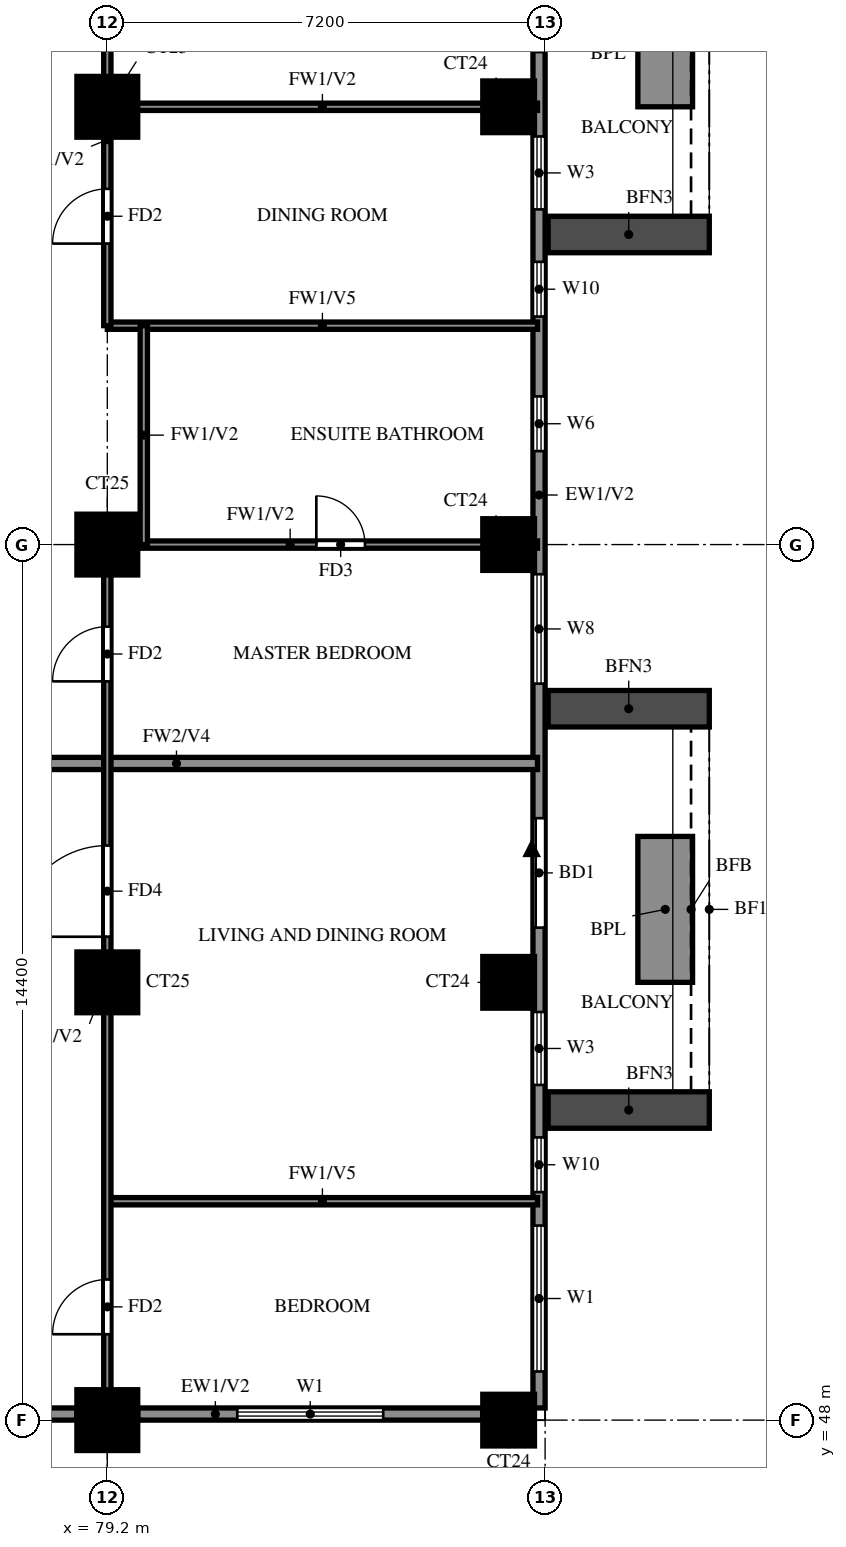
"""IFC4 building model, lengths in metres.
Left out: names, types, materials, properties, quantities, classifications, styles, units other than length and angle.
Written with IfcOpenShell. Run it as: python <this file> out.ifc"""

import sys

from ifc_helpers import new_model, si_unit, direction, frame, frame_2d, origin, origin_2d, place, context, subcontext, project, spatial, rectangle, extrude, source, transform, mapped, element, fill, save


model = new_model("IFC4")
c1 = context("Model", 3, precision=1e-05, world=origin(), true_north=direction((0.0, 1.0)))
c2 = subcontext(c1, "Body", "Model", "MODEL_VIEW")
j1 = project(units=[si_unit("LENGTHUNIT", "METRE"), si_unit("PLANEANGLEUNIT", "RADIAN")], contexts=[c1])
p1 = place(None, origin())
s1 = spatial("IfcSite", under=j1, at=p1, CompositionType="ELEMENT")
p2 = place(p1, origin())
s2 = spatial("IfcBuilding", under=s1, at=p2, CompositionType="ELEMENT")
p3 = place(p2, frame((0.0, 0.0, 143.0)))
s3 = spatial("IfcBuildingStorey", under=s2, at=p3, CompositionType="ELEMENT", Elevation=143.0)
m1 = source(origin(), c2, "Body", "SweptSolid", [
    extrude(rectangle(XDim=1.0, YDim=1.0, at=origin_2d()), origin(), (0.0, 0.0, 1.0), 3.2),
])
p4 = place(p3, frame((79.2, 48.0, 0.0), z_axis=(0.0, 0.0, 1.0), x_axis=(1.0, 0.0, 0.0)))
e1 = element("IfcColumn", 1, at=p4, inside=s3, PredefinedType="COLUMN", context=c2, shape_type="MappedRepresentation", body=[
    mapped(m1, transform((0.0, 0.0, 0.0))),
])
m2 = source(origin(), c2, "Body", "SweptSolid", [
    extrude(rectangle(XDim=0.85, YDim=0.85, at=origin_2d()), origin(), (0.0, 0.0, 1.0), 3.2),
])
p5 = place(p3, frame((85.8, 48.0, 0.0), z_axis=(0.0, 0.0, 1.0), x_axis=(1.0, 0.0, 0.0)))
e2 = element("IfcColumn", 2, at=p5, inside=s3, PredefinedType="COLUMN", context=c2, shape_type="MappedRepresentation", body=[
    mapped(m2, transform((0.0, 0.0, 0.0))),
])
p6 = place(p3, frame((79.2, 55.2, 0.0), z_axis=(0.0, 0.0, 1.0), x_axis=(1.0, 0.0, 0.0)))
e3 = element("IfcColumn", 3, at=p6, inside=s3, PredefinedType="COLUMN", context=c2, shape_type="MappedRepresentation", body=[
    mapped(m1, transform((0.0, 0.0, 0.0))),
])
p7 = place(p3, frame((85.8, 55.2, 0.0), z_axis=(0.0, 0.0, 1.0), x_axis=(1.0, 0.0, 0.0)))
e4 = element("IfcColumn", 4, at=p7, inside=s3, PredefinedType="COLUMN", context=c2, shape_type="MappedRepresentation", body=[
    mapped(m2, transform((0.0, 0.0, 0.0))),
])
p8 = place(p3, frame((79.2, 62.4, 0.0), z_axis=(0.0, 0.0, 1.0), x_axis=(1.0, 0.0, 0.0)))
e5 = element("IfcColumn", 5, at=p8, inside=s3, PredefinedType="COLUMN", context=c2, shape_type="MappedRepresentation", body=[
    mapped(m1, transform((0.0, 0.0, 0.0))),
])
p9 = place(p3, frame((85.8, 62.4, 0.0), z_axis=(0.0, 0.0, 1.0), x_axis=(1.0, 0.0, 0.0)))
e6 = element("IfcColumn", 6, at=p9, inside=s3, PredefinedType="COLUMN", context=c2, shape_type="MappedRepresentation", body=[
    mapped(m2, transform((0.0, 0.0, 0.0))),
])
p10 = place(p3, frame((79.2, 69.6, 0.0), z_axis=(0.0, 0.0, 1.0), x_axis=(1.0, 0.0, 0.0)))
e7 = element("IfcColumn", 7, at=p10, inside=s3, PredefinedType="COLUMN", context=c2, shape_type="MappedRepresentation", body=[
    mapped(m1, transform((0.0, 0.0, 0.0))),
])
p11 = place(p3, frame((85.8, 69.6, 0.0), z_axis=(0.0, 0.0, 1.0), x_axis=(1.0, 0.0, 0.0)))
e8 = element("IfcColumn", 8, at=p11, inside=s3, PredefinedType="COLUMN", context=c2, shape_type="MappedRepresentation", body=[
    mapped(m2, transform((0.0, 0.0, 0.0))),
])
p12 = place(p3, frame((85.719, 39.881, 0.0), z_axis=(0.0, 0.0, 1.0), x_axis=(-0.86377618652, 0.503875678716, 0.0)))
e9 = element("IfcWall", 9, at=p12, inside=s3, PredefinedType="SOLIDWALL", context=c2, shape_type="SweptSolid", body=[
    extrude(rectangle(XDim=16.311, YDim=0.2, at=frame_2d((8.156, 0.0))), origin(), (0.0, 0.0, 1.0), 3.2),
])
p13 = place(p12, frame((13.326, 0.0, 1.5)))
e10 = element("IfcOpeningElement", 10, at=p13, cuts=e9, PredefinedType="OPENING", context=c2, shape_type="SweptSolid", body=[
    extrude(rectangle(XDim=0.9, YDim=0.9, at=frame_2d((0.45, 0.45))), frame((0.0, 0.11, 0.0), z_axis=(0.0, -1.0, 0.0), x_axis=(1.0, 0.0, 0.0)), (0.0, 0.0, 1.0), 0.22),
])
p14 = place(p3, frame((71.99, 48.1, 0.0), z_axis=(0.0, 0.0, 1.0), x_axis=(1.0, 0.0, 0.0)))
e11 = element("IfcWall", 11, at=p14, inside=s3, PredefinedType="SOLIDWALL", context=c2, shape_type="SweptSolid", body=[
    extrude(rectangle(XDim=6.71, YDim=0.2, at=frame_2d((3.355, 0.0))), origin(), (0.0, 0.0, 1.0), 3.2),
])
p15 = place(p14, frame((2.205, 0.0, 1.5)))
e12 = element("IfcOpeningElement", 12, at=p15, cuts=e11, PredefinedType="OPENING", context=c2, shape_type="SweptSolid", body=[
    extrude(rectangle(XDim=0.9, YDim=0.9, at=frame_2d((0.45, 0.45))), frame((0.0, 0.11, 0.0), z_axis=(0.0, -1.0, 0.0), x_axis=(1.0, 0.0, 0.0)), (0.0, 0.0, 1.0), 0.22),
])
p16 = place(p3, frame((79.7, 48.1, 0.0), z_axis=(0.0, 0.0, 1.0), x_axis=(1.0, 0.0, 0.0)))
e13 = element("IfcWall", 13, at=p16, inside=s3, PredefinedType="SOLIDWALL", context=c2, shape_type="SweptSolid", body=[
    extrude(rectangle(XDim=5.675, YDim=0.2, at=frame_2d((2.837, 0.0))), origin(), (0.0, 0.0, 1.0), 3.2),
])
p17 = place(p16, frame((1.637, 0.0, 0.6)))
e14 = element("IfcOpeningElement", 14, at=p17, cuts=e13, PredefinedType="OPENING", context=c2, shape_type="SweptSolid", body=[
    extrude(rectangle(XDim=2.4, YDim=2.4, at=frame_2d((1.2, 1.2))), frame((0.0, 0.11, 0.0), z_axis=(0.0, -1.0, 0.0), x_axis=(1.0, 0.0, 0.0)), (0.0, 0.0, 1.0), 0.22),
])
p18 = place(p3, frame((86.3, 48.2, 0.0), z_axis=(0.0, 0.0, 1.0), x_axis=(0.0, 1.0, 0.0)))
e15 = element("IfcWall", 15, at=p18, inside=s3, PredefinedType="SOLIDWALL", context=c2, shape_type="SweptSolid", body=[
    extrude(rectangle(XDim=28.6, YDim=0.2, at=frame_2d((14.3, 0.0))), origin(), (0.0, 0.0, 1.0), 3.2),
])
p19 = place(p18, frame((7.9, 0.0, 0.0)))
e16 = element("IfcOpeningElement", 16, at=p19, cuts=e15, PredefinedType="OPENING", context=c2, shape_type="SweptSolid", body=[
    extrude(rectangle(XDim=1.8, YDim=2.4, at=frame_2d((0.9, 1.2))), frame((0.0, 0.11, 0.0), z_axis=(0.0, -1.0, 0.0), x_axis=(1.0, 0.0, 0.0)), (0.0, 0.0, 1.0), 0.22),
])
p20 = place(p18, frame((22.3, 0.0, 0.0)))
e17 = element("IfcOpeningElement", 17, at=p20, cuts=e15, PredefinedType="OPENING", context=c2, shape_type="SweptSolid", body=[
    extrude(rectangle(XDim=1.8, YDim=2.4, at=frame_2d((0.9, 1.2))), frame((0.0, 0.11, 0.0), z_axis=(0.0, -1.0, 0.0), x_axis=(1.0, 0.0, 0.0)), (0.0, 0.0, 1.0), 0.22),
])
p21 = place(p18, frame((0.6, 0.0, 0.6)))
e18 = element("IfcOpeningElement", 18, at=p21, cuts=e15, PredefinedType="OPENING", context=c2, shape_type="SweptSolid", body=[
    extrude(rectangle(XDim=2.4, YDim=2.4, at=frame_2d((1.2, 1.2))), frame((0.0, 0.11, 0.0), z_axis=(0.0, -1.0, 0.0), x_axis=(1.0, 0.0, 0.0)), (0.0, 0.0, 1.0), 0.22),
])
p22 = place(p18, frame((3.55, 0.0, 0.6)))
e19 = element("IfcOpeningElement", 19, at=p22, cuts=e15, PredefinedType="OPENING", context=c2, shape_type="SweptSolid", body=[
    extrude(rectangle(XDim=0.9, YDim=2.4, at=frame_2d((0.45, 1.2))), frame((0.0, 0.11, 0.0), z_axis=(0.0, -1.0, 0.0), x_axis=(1.0, 0.0, 0.0)), (0.0, 0.0, 1.0), 0.22),
])
p23 = place(p18, frame((5.312, 0.0, 0.6)))
e20 = element("IfcOpeningElement", 20, at=p23, cuts=e15, PredefinedType="OPENING", context=c2, shape_type="SweptSolid", body=[
    extrude(rectangle(XDim=1.2, YDim=2.4, at=frame_2d((0.6, 1.2))), frame((0.0, 0.11, 0.0), z_axis=(0.0, -1.0, 0.0), x_axis=(1.0, 0.0, 0.0)), (0.0, 0.0, 1.0), 0.22),
])
p24 = place(p18, frame((11.913, 0.0, 0.6)))
e21 = element("IfcOpeningElement", 21, at=p24, cuts=e15, PredefinedType="OPENING", context=c2, shape_type="SweptSolid", body=[
    extrude(rectangle(XDim=1.8, YDim=2.4, at=frame_2d((0.9, 1.2))), frame((0.0, 0.11, 0.0), z_axis=(0.0, -1.0, 0.0), x_axis=(1.0, 0.0, 0.0)), (0.0, 0.0, 1.0), 0.22),
])
p25 = place(p18, frame((15.738, 0.0, 1.5)))
e22 = element("IfcOpeningElement", 22, at=p25, cuts=e15, PredefinedType="OPENING", context=c2, shape_type="SweptSolid", body=[
    extrude(rectangle(XDim=0.9, YDim=0.9, at=frame_2d((0.45, 0.45))), frame((0.0, 0.11, 0.0), z_axis=(0.0, -1.0, 0.0), x_axis=(1.0, 0.0, 0.0)), (0.0, 0.0, 1.0), 0.22),
])
p26 = place(p18, frame((17.95, 0.0, 0.6)))
e23 = element("IfcOpeningElement", 23, at=p26, cuts=e15, PredefinedType="OPENING", context=c2, shape_type="SweptSolid", body=[
    extrude(rectangle(XDim=0.9, YDim=2.4, at=frame_2d((0.45, 1.2))), frame((0.0, 0.11, 0.0), z_axis=(0.0, -1.0, 0.0), x_axis=(1.0, 0.0, 0.0)), (0.0, 0.0, 1.0), 0.22),
])
p27 = place(p18, frame((19.712, 0.0, 0.6)))
e24 = element("IfcOpeningElement", 24, at=p27, cuts=e15, PredefinedType="OPENING", context=c2, shape_type="SweptSolid", body=[
    extrude(rectangle(XDim=1.2, YDim=2.4, at=frame_2d((0.6, 1.2))), frame((0.0, 0.11, 0.0), z_axis=(0.0, -1.0, 0.0), x_axis=(1.0, 0.0, 0.0)), (0.0, 0.0, 1.0), 0.22),
])
p28 = place(p18, frame((26.312, 0.0, 0.6)))
e25 = element("IfcOpeningElement", 25, at=p28, cuts=e15, PredefinedType="OPENING", context=c2, shape_type="SweptSolid", body=[
    extrude(rectangle(XDim=1.8, YDim=2.4, at=frame_2d((0.9, 1.2))), frame((0.0, 0.11, 0.0), z_axis=(0.0, -1.0, 0.0), x_axis=(1.0, 0.0, 0.0)), (0.0, 0.0, 1.0), 0.22),
])
for number, where, z_axis, x_axis in (
    (26, (86.45, 53.1, 0.0), (0.0, 0.0, 1.0), (1.0, 0.0, 0.0)),
    (27, (86.45, 59.7, 0.0), (0.0, 0.0, 1.0), (1.0, 0.0, 0.0)),
):
    element("IfcWall", number, at=place(p3, frame(where, z_axis=z_axis, x_axis=x_axis)), inside=s3, PredefinedType="SOLIDWALL", context=c2, shape_type="SweptSolid", body=[
        extrude(rectangle(XDim=2.65, YDim=0.6, at=frame_2d((1.325, 0.0))), origin(), (0.0, 0.0, 1.0), 2.85),
    ])
p29 = place(p3, frame((88.375, 55.2, 0.0), z_axis=(0.0, 0.0, 1.0), x_axis=(0.0, 1.0, 0.0)))
e28 = element("IfcWall", 28, at=p29, inside=s3, PredefinedType="SOLIDWALL", context=c2, shape_type="SweptSolid", body=[
    extrude(rectangle(XDim=2.4, YDim=0.9, at=frame_2d((1.2, 0.0))), origin(), (0.0, 0.0, 1.0), 0.9),
])
p30 = place(p3, frame((86.45, 67.5, 0.0), z_axis=(0.0, 0.0, 1.0), x_axis=(1.0, 0.0, 0.0)))
e29 = element("IfcWall", 29, at=p30, inside=s3, PredefinedType="SOLIDWALL", context=c2, shape_type="SweptSolid", body=[
    extrude(rectangle(XDim=2.65, YDim=0.6, at=frame_2d((1.325, 0.0))), origin(), (0.0, 0.0, 1.0), 2.85),
])
p31 = place(p3, frame((88.375, 69.6, 0.0), z_axis=(0.0, 0.0, 1.0), x_axis=(0.0, 1.0, 0.0)))
e30 = element("IfcWall", 30, at=p31, inside=s3, PredefinedType="SOLIDWALL", context=c2, shape_type="SweptSolid", body=[
    extrude(rectangle(XDim=2.4, YDim=0.9, at=frame_2d((1.2, 0.0))), origin(), (0.0, 0.0, 1.0), 0.9),
])
p32 = place(p3, frame((74.4, 58.8, 0.0), z_axis=(0.0, 0.0, 1.0), x_axis=(1.0, 0.0, 0.0)))
e31 = element("IfcWall", 31, at=p32, inside=s3, PredefinedType="SOLIDWALL", context=c2, shape_type="SweptSolid", body=[
    extrude(rectangle(XDim=11.875, YDim=0.2, at=frame_2d((5.938, 0.0))), origin(), (0.0, 0.0, 1.0), 2.3),
])
p33 = place(p3, frame((79.2, 51.6, 0.0), z_axis=(0.0, 0.0, 1.0), x_axis=(1.0, 0.0, 0.0)))
e32 = element("IfcWall", 32, at=p33, inside=s3, PredefinedType="PARTITIONING", context=c2, shape_type="SweptSolid", body=[
    extrude(rectangle(XDim=7.075, YDim=0.12, at=frame_2d((3.538, 0.0))), origin(), (0.0, 0.0, 1.0), 2.3),
])
p34 = place(p3, frame((79.2, 62.4, 0.0), z_axis=(0.0, 0.0, 1.0), x_axis=(1.0, 0.0, 0.0)))
e33 = element("IfcWall", 33, at=p34, inside=s3, PredefinedType="PARTITIONING", context=c2, shape_type="SweptSolid", body=[
    extrude(rectangle(XDim=7.075, YDim=0.12, at=frame_2d((3.538, 0.0))), origin(), (0.0, 0.0, 1.0), 3.2),
])
p35 = place(p34, frame((3.438, 0.0, 0.0)))
e34 = element("IfcOpeningElement", 34, at=p35, cuts=e33, PredefinedType="OPENING", context=c2, shape_type="SweptSolid", body=[
    extrude(rectangle(XDim=0.8, YDim=2.1, at=frame_2d((0.4, 1.05))), frame((0.0, 0.07, 0.0), z_axis=(0.0, -1.0, 0.0), x_axis=(1.0, 0.0, 0.0)), (0.0, 0.0, 1.0), 0.14),
])
p36 = place(p3, frame((79.2, 66.0, 0.0), z_axis=(0.0, 0.0, 1.0), x_axis=(1.0, 0.0, 0.0)))
e35 = element("IfcWall", 35, at=p36, inside=s3, PredefinedType="PARTITIONING", context=c2, shape_type="SweptSolid", body=[
    extrude(rectangle(XDim=7.075, YDim=0.12, at=frame_2d((3.538, 0.0))), origin(), (0.0, 0.0, 1.0), 2.3),
])
p37 = place(p3, frame((79.2, 69.6, 0.0), z_axis=(0.0, 0.0, 1.0), x_axis=(1.0, 0.0, 0.0)))
e36 = element("IfcWall", 36, at=p37, inside=s3, PredefinedType="PARTITIONING", context=c2, shape_type="SweptSolid", body=[
    extrude(rectangle(XDim=7.075, YDim=0.12, at=frame_2d((3.538, 0.0))), origin(), (0.0, 0.0, 1.0), 3.2),
])
p38 = place(p3, frame((79.2, 48.125, 0.0), z_axis=(0.0, 0.0, 1.0), x_axis=(0.0, 1.0, 0.0)))
e37 = element("IfcWall", 37, at=p38, inside=s3, PredefinedType="PARTITIONING", context=c2, shape_type="SweptSolid", body=[
    extrude(rectangle(XDim=14.275, YDim=0.12, at=frame_2d((7.137, 0.0))), origin(), (0.0, 0.0, 1.0), 3.2),
])
p39 = place(p38, frame((1.288, 0.0, 0.0)))
e38 = element("IfcOpeningElement", 38, at=p39, cuts=e37, PredefinedType="OPENING", context=c2, shape_type="SweptSolid", body=[
    extrude(rectangle(XDim=0.9, YDim=2.1, at=frame_2d((0.45, 1.05))), frame((0.0, 0.07, 0.0), z_axis=(0.0, -1.0, 0.0), x_axis=(1.0, 0.0, 0.0)), (0.0, 0.0, 1.0), 0.14),
])
p40 = place(p38, frame((7.825, 0.0, 0.0)))
e39 = element("IfcOpeningElement", 39, at=p40, cuts=e37, PredefinedType="OPENING", context=c2, shape_type="SweptSolid", body=[
    extrude(rectangle(XDim=1.5, YDim=2.1, at=frame_2d((0.75, 1.05))), frame((0.0, 0.07, 0.0), z_axis=(0.0, -1.0, 0.0), x_axis=(1.0, 0.0, 0.0)), (0.0, 0.0, 1.0), 0.14),
])
p41 = place(p38, frame((12.025, 0.0, 0.0)))
e40 = element("IfcOpeningElement", 40, at=p41, cuts=e37, PredefinedType="OPENING", context=c2, shape_type="SweptSolid", body=[
    extrude(rectangle(XDim=0.9, YDim=2.1, at=frame_2d((0.45, 1.05))), frame((0.0, 0.07, 0.0), z_axis=(0.0, -1.0, 0.0), x_axis=(1.0, 0.0, 0.0)), (0.0, 0.0, 1.0), 0.14),
])
p42 = place(p3, frame((79.2, 66.0, 0.0), z_axis=(0.0, 0.0, 1.0), x_axis=(0.0, 1.0, 0.0)))
e41 = element("IfcWall", 41, at=p42, inside=s3, PredefinedType="PARTITIONING", context=c2, shape_type="SweptSolid", body=[
    extrude(rectangle(XDim=7.2, YDim=0.12, at=frame_2d((3.6, 0.0))), origin(), (0.0, 0.0, 1.0), 3.2),
])
p43 = place(p42, frame((1.35, 0.0, 0.0)))
e42 = element("IfcOpeningElement", 42, at=p43, cuts=e41, PredefinedType="OPENING", context=c2, shape_type="SweptSolid", body=[
    extrude(rectangle(XDim=0.9, YDim=2.1, at=frame_2d((0.45, 1.05))), frame((0.0, 0.07, 0.0), z_axis=(0.0, -1.0, 0.0), x_axis=(1.0, 0.0, 0.0)), (0.0, 0.0, 1.0), 0.14),
])
p44 = place(p42, frame((4.95, 0.0, 0.0)))
e43 = element("IfcOpeningElement", 43, at=p44, cuts=e41, PredefinedType="OPENING", context=c2, shape_type="SweptSolid", body=[
    extrude(rectangle(XDim=0.9, YDim=2.1, at=frame_2d((0.45, 1.05))), frame((0.0, 0.07, 0.0), z_axis=(0.0, -1.0, 0.0), x_axis=(1.0, 0.0, 0.0)), (0.0, 0.0, 1.0), 0.14),
])
p45 = place(p3, frame((79.8, 62.4, 0.0), z_axis=(0.0, 0.0, 1.0), x_axis=(0.0, 1.0, 0.0)))
e44 = element("IfcWall", 44, at=p45, inside=s3, PredefinedType="PARTITIONING", context=c2, shape_type="SweptSolid", body=[
    extrude(rectangle(XDim=3.6, YDim=0.12, at=frame_2d((1.8, 0.0))), origin(), (0.0, 0.0, 1.0), 3.2),
])
p46 = place(p17, origin())
e45 = element("IfcWindow", 45, at=p46, inside=s3, PartitioningType="DOUBLE_PANEL_VERTICAL", PredefinedType="WINDOW", context=c2, shape_type="SweptSolid", body=[
    extrude(rectangle(XDim=2.4, YDim=2.4, at=frame_2d((1.2, 1.2))), frame((0.0, 0.03, 0.0), z_axis=(0.0, -1.0, 0.0), x_axis=(1.0, 0.0, 0.0)), (0.0, 0.0, 1.0), 0.06),
])
fill(e14, e45)
p47 = place(p19, origin())
e46 = element("IfcDoor", 46, at=p47, inside=s3, OperationType="DOUBLE_DOOR_SLIDING", PredefinedType="DOOR", context=c2, shape_type="SweptSolid", body=[
    extrude(rectangle(XDim=1.8, YDim=2.4, at=frame_2d((0.9, 1.2))), frame((0.0, 0.025, 0.0), z_axis=(0.0, -1.0, 0.0), x_axis=(1.0, 0.0, 0.0)), (0.0, 0.0, 1.0), 0.05),
])
fill(e16, e46)
p48 = place(p20, origin())
e47 = element("IfcDoor", 47, at=p48, inside=s3, OperationType="DOUBLE_DOOR_SLIDING", PredefinedType="DOOR", context=c2, shape_type="SweptSolid", body=[
    extrude(rectangle(XDim=1.8, YDim=2.4, at=frame_2d((0.9, 1.2))), frame((0.0, 0.025, 0.0), z_axis=(0.0, -1.0, 0.0), x_axis=(1.0, 0.0, 0.0)), (0.0, 0.0, 1.0), 0.05),
])
fill(e17, e47)
p49 = place(p21, origin())
e48 = element("IfcWindow", 48, at=p49, inside=s3, PartitioningType="DOUBLE_PANEL_VERTICAL", PredefinedType="WINDOW", context=c2, shape_type="SweptSolid", body=[
    extrude(rectangle(XDim=2.4, YDim=2.4, at=frame_2d((1.2, 1.2))), frame((0.0, 0.03, 0.0), z_axis=(0.0, -1.0, 0.0), x_axis=(1.0, 0.0, 0.0)), (0.0, 0.0, 1.0), 0.06),
])
fill(e18, e48)
p50 = place(p22, origin())
e49 = element("IfcWindow", 49, at=p50, inside=s3, PartitioningType="SINGLE_PANEL", PredefinedType="WINDOW", context=c2, shape_type="SweptSolid", body=[
    extrude(rectangle(XDim=0.9, YDim=2.4, at=frame_2d((0.45, 1.2))), frame((0.0, 0.03, 0.0), z_axis=(0.0, -1.0, 0.0), x_axis=(1.0, 0.0, 0.0)), (0.0, 0.0, 1.0), 0.06),
])
fill(e19, e49)
p51 = place(p23, origin())
e50 = element("IfcWindow", 50, at=p51, inside=s3, PartitioningType="SINGLE_PANEL", PredefinedType="WINDOW", context=c2, shape_type="SweptSolid", body=[
    extrude(rectangle(XDim=1.2, YDim=2.4, at=frame_2d((0.6, 1.2))), frame((0.0, 0.03, 0.0), z_axis=(0.0, -1.0, 0.0), x_axis=(1.0, 0.0, 0.0)), (0.0, 0.0, 1.0), 0.06),
])
fill(e20, e50)
p52 = place(p24, origin())
e51 = element("IfcWindow", 51, at=p52, inside=s3, PartitioningType="DOUBLE_PANEL_VERTICAL", PredefinedType="WINDOW", context=c2, shape_type="SweptSolid", body=[
    extrude(rectangle(XDim=1.8, YDim=2.4, at=frame_2d((0.9, 1.2))), frame((0.0, 0.03, 0.0), z_axis=(0.0, -1.0, 0.0), x_axis=(1.0, 0.0, 0.0)), (0.0, 0.0, 1.0), 0.06),
])
fill(e21, e51)
p53 = place(p25, origin())
e52 = element("IfcWindow", 52, at=p53, inside=s3, PartitioningType="SINGLE_PANEL", PredefinedType="WINDOW", context=c2, shape_type="SweptSolid", body=[
    extrude(rectangle(XDim=0.9, YDim=0.9, at=frame_2d((0.45, 0.45))), frame((0.0, 0.03, 0.0), z_axis=(0.0, -1.0, 0.0), x_axis=(1.0, 0.0, 0.0)), (0.0, 0.0, 1.0), 0.06),
])
fill(e22, e52)
p54 = place(p26, origin())
e53 = element("IfcWindow", 53, at=p54, inside=s3, PartitioningType="SINGLE_PANEL", PredefinedType="WINDOW", context=c2, shape_type="SweptSolid", body=[
    extrude(rectangle(XDim=0.9, YDim=2.4, at=frame_2d((0.45, 1.2))), frame((0.0, 0.03, 0.0), z_axis=(0.0, -1.0, 0.0), x_axis=(1.0, 0.0, 0.0)), (0.0, 0.0, 1.0), 0.06),
])
fill(e23, e53)
p55 = place(p27, origin())
e54 = element("IfcWindow", 54, at=p55, inside=s3, PartitioningType="SINGLE_PANEL", PredefinedType="WINDOW", context=c2, shape_type="SweptSolid", body=[
    extrude(rectangle(XDim=1.2, YDim=2.4, at=frame_2d((0.6, 1.2))), frame((0.0, 0.03, 0.0), z_axis=(0.0, -1.0, 0.0), x_axis=(1.0, 0.0, 0.0)), (0.0, 0.0, 1.0), 0.06),
])
fill(e24, e54)
p56 = place(p39, origin())
e55 = element("IfcDoor", 55, at=p56, inside=s3, OperationType="SINGLE_SWING_LEFT", PredefinedType="DOOR", context=c2, shape_type="SweptSolid", body=[
    extrude(rectangle(XDim=0.9, YDim=2.1, at=frame_2d((0.45, 1.05))), frame((0.0, 0.025, 0.0), z_axis=(0.0, -1.0, 0.0), x_axis=(1.0, 0.0, 0.0)), (0.0, 0.0, 1.0), 0.05),
])
fill(e38, e55)
p57 = place(p40, origin())
e56 = element("IfcDoor", 56, at=p57, inside=s3, OperationType="SINGLE_SWING_LEFT", PredefinedType="DOOR", context=c2, shape_type="SweptSolid", body=[
    extrude(rectangle(XDim=1.5, YDim=2.1, at=frame_2d((0.75, 1.05))), frame((0.0, 0.025, 0.0), z_axis=(0.0, -1.0, 0.0), x_axis=(1.0, 0.0, 0.0)), (0.0, 0.0, 1.0), 0.05),
])
fill(e39, e56)
p58 = place(p41, origin())
e57 = element("IfcDoor", 57, at=p58, inside=s3, OperationType="SINGLE_SWING_LEFT", PredefinedType="DOOR", context=c2, shape_type="SweptSolid", body=[
    extrude(rectangle(XDim=0.9, YDim=2.1, at=frame_2d((0.45, 1.05))), frame((0.0, 0.025, 0.0), z_axis=(0.0, -1.0, 0.0), x_axis=(1.0, 0.0, 0.0)), (0.0, 0.0, 1.0), 0.05),
])
fill(e40, e57)
p59 = place(p35, origin())
e58 = element("IfcDoor", 58, at=p59, inside=s3, OperationType="SINGLE_SWING_RIGHT", PredefinedType="DOOR", context=c2, shape_type="SweptSolid", body=[
    extrude(rectangle(XDim=0.8, YDim=2.1, at=frame_2d((0.4, 1.05))), frame((0.0, 0.025, 0.0), z_axis=(0.0, -1.0, 0.0), x_axis=(1.0, 0.0, 0.0)), (0.0, 0.0, 1.0), 0.05),
])
fill(e34, e58)
p60 = place(p43, origin())
e59 = element("IfcDoor", 59, at=p60, inside=s3, OperationType="SINGLE_SWING_LEFT", PredefinedType="DOOR", context=c2, shape_type="SweptSolid", body=[
    extrude(rectangle(XDim=0.9, YDim=2.1, at=frame_2d((0.45, 1.05))), frame((0.0, 0.025, 0.0), z_axis=(0.0, -1.0, 0.0), x_axis=(1.0, 0.0, 0.0)), (0.0, 0.0, 1.0), 0.05),
])
fill(e42, e59)
save(model, sys.argv[1])
